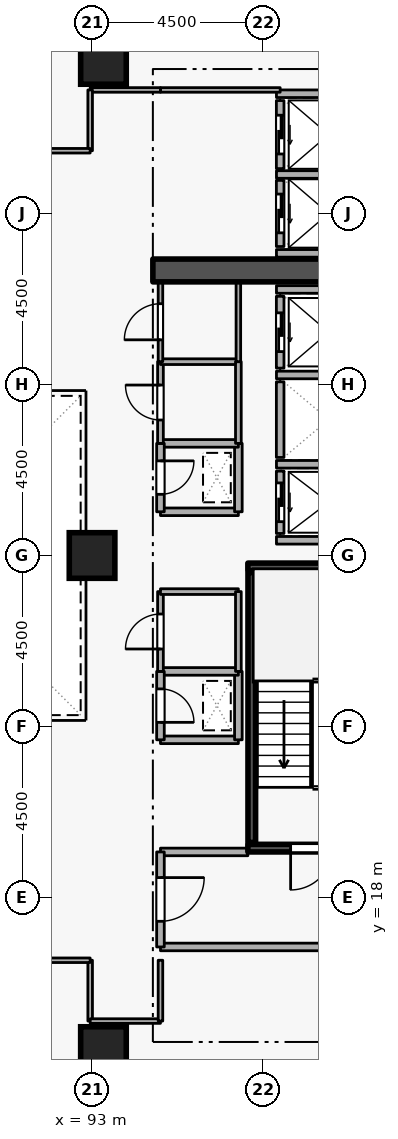
"""IFC4 building model, lengths in metres.
Left out: names, types, materials, properties, quantities, classifications, styles, units other than length and angle.
Written with IfcOpenShell. Run it as: python <this file> out.ifc"""

import sys

from ifc_helpers import new_model, si_unit, direction, frame, frame_2d, origin, origin_2d, place, context, subcontext, project, spatial, rectangle, extrude, element, fill, save


model = new_model("IFC4")
c1 = context("Model", 3, precision=1e-05, world=origin(), true_north=direction((0.0, 1.0)))
c2 = subcontext(c1, "Body", "Model", "MODEL_VIEW")
j1 = project(units=[si_unit("LENGTHUNIT", "METRE"), si_unit("PLANEANGLEUNIT", "RADIAN")], contexts=[c1])
p1 = place(None, origin())
s1 = spatial("IfcSite", under=j1, at=p1, CompositionType="ELEMENT")
p2 = place(p1, origin())
s2 = spatial("IfcBuilding", under=s1, at=p2, CompositionType="ELEMENT")
p3 = place(p2, frame((0.0, 0.0, 83.7)))
s3 = spatial("IfcBuildingStorey", under=s2, at=p3, CompositionType="ELEMENT", Elevation=83.7)
p4 = place(p3, frame((94.6, 34.5, 0.0), z_axis=(0.0, 0.0, 1.0), x_axis=(1.0, 0.0, 0.0)))
e1 = element("IfcWall", 1, at=p4, inside=s3, PredefinedType="SHEAR", context=c2, shape_type="SweptSolid", body=[
    extrude(rectangle(XDim=5.7, YDim=0.6, at=frame_2d((2.85, 0.0))), origin(), (0.0, 0.0, 1.0), 3.6),
])
for number, where, z_axis, x_axis in (
    (2, (93.3, 14.0, 0.0), (0.0, 0.0, 1.0), (1.0, 0.0, 0.0)),
    (3, (93.3, 40.0, 0.0), (0.0, 0.0, 1.0), (1.0, 0.0, 0.0)),
    (4, (93.0, 27.0, 0.0), (0.0, 0.0, 1.0), (1.0, 0.0, 0.0)),
):
    element("IfcColumn", number, at=place(p3, frame(where, z_axis=z_axis, x_axis=x_axis)), inside=s3, PredefinedType="COLUMN", context=c2, shape_type="SweptSolid", body=[
        extrude(rectangle(XDim=1.2, YDim=1.2, at=origin_2d()), origin(), (0.0, 0.0, 1.0), 3.6),
    ])
p5 = place(p3, frame((97.95, 29.22, 0.0), z_axis=(0.0, 0.0, 1.0), x_axis=(0.0, -1.0, 0.0)))
e5 = element("IfcWall", 5, at=p5, inside=s3, PredefinedType="STANDARD", context=c2, shape_type="SweptSolid", body=[
    extrude(rectangle(XDim=1.64, YDim=0.2, at=frame_2d((0.82, 0.0))), origin(), (0.0, 0.0, 1.0), 3.34),
])
p6 = place(p5, frame((0.31, 0.0, 0.0)))
e6 = element("IfcOpeningElement", 6, at=p6, cuts=e5, PredefinedType="OPENING", context=c2, shape_type="SweptSolid", body=[
    extrude(rectangle(XDim=1.02, YDim=2.06, at=frame_2d((0.51, 1.03))), frame((0.0, 0.11, 0.0), z_axis=(0.0, -1.0, 0.0), x_axis=(1.0, 0.0, 0.0)), (0.0, 0.0, 1.0), 0.22),
])
p7 = place(p3, frame((97.95, 31.57, 0.0), z_axis=(0.0, 0.0, 1.0), x_axis=(0.0, -1.0, 0.0)))
e7 = element("IfcWall", 7, at=p7, inside=s3, PredefinedType="STANDARD", context=c2, shape_type="SweptSolid", body=[
    extrude(rectangle(XDim=1.99, YDim=0.2, at=frame_2d((0.995, 0.0))), origin(), (0.0, 0.0, 1.0), 3.34),
])
p8 = place(p3, frame((97.95, 33.82, 0.0), z_axis=(0.0, 0.0, 1.0), x_axis=(0.0, -1.0, 0.0)))
e8 = element("IfcWall", 8, at=p8, inside=s3, PredefinedType="STANDARD", context=c2, shape_type="SweptSolid", body=[
    extrude(rectangle(XDim=1.89, YDim=0.2, at=frame_2d((0.945, 0.0))), origin(), (0.0, 0.0, 1.0), 3.34),
])
p9 = place(p8, frame((0.435, 0.0, 0.0)))
e9 = element("IfcOpeningElement", 9, at=p9, cuts=e8, PredefinedType="OPENING", context=c2, shape_type="SweptSolid", body=[
    extrude(rectangle(XDim=1.02, YDim=2.06, at=frame_2d((0.51, 1.03))), frame((0.0, 0.11, 0.0), z_axis=(0.0, -1.0, 0.0), x_axis=(1.0, 0.0, 0.0)), (0.0, 0.0, 1.0), 0.22),
])
p10 = place(p3, frame((97.95, 36.87, 0.0), z_axis=(0.0, 0.0, 1.0), x_axis=(0.0, -1.0, 0.0)))
e10 = element("IfcWall", 10, at=p10, inside=s3, PredefinedType="STANDARD", context=c2, shape_type="SweptSolid", body=[
    extrude(rectangle(XDim=1.74, YDim=0.2, at=frame_2d((0.87, 0.0))), origin(), (0.0, 0.0, 1.0), 3.34),
])
p11 = place(p10, frame((0.36, 0.0, 0.0)))
e11 = element("IfcOpeningElement", 11, at=p11, cuts=e10, PredefinedType="OPENING", context=c2, shape_type="SweptSolid", body=[
    extrude(rectangle(XDim=1.02, YDim=2.06, at=frame_2d((0.51, 1.03))), frame((0.0, 0.11, 0.0), z_axis=(0.0, -1.0, 0.0), x_axis=(1.0, 0.0, 0.0)), (0.0, 0.0, 1.0), 0.22),
])
p12 = place(p3, frame((97.95, 38.97, 0.0), z_axis=(0.0, 0.0, 1.0), x_axis=(0.0, -1.0, 0.0)))
e12 = element("IfcWall", 12, at=p12, inside=s3, PredefinedType="STANDARD", context=c2, shape_type="SweptSolid", body=[
    extrude(rectangle(XDim=1.79, YDim=0.2, at=frame_2d((0.895, 0.0))), origin(), (0.0, 0.0, 1.0), 3.34),
])
p13 = place(p12, frame((0.385, 0.0, 0.0)))
e13 = element("IfcOpeningElement", 13, at=p13, cuts=e12, PredefinedType="OPENING", context=c2, shape_type="SweptSolid", body=[
    extrude(rectangle(XDim=1.02, YDim=2.06, at=frame_2d((0.51, 1.03))), frame((0.0, 0.11, 0.0), z_axis=(0.0, -1.0, 0.0), x_axis=(1.0, 0.0, 0.0)), (0.0, 0.0, 1.0), 0.22),
])
for number, where, z_axis, x_axis in (
    (14, (97.852, 29.4, 0.0), (0.0, 0.0, 1.0), (1.0, 0.0, 0.0)),
    (15, (97.852, 27.4, 0.0), (0.0, 0.0, 1.0), (1.0, 0.0, 0.0)),
    (16, (97.852, 31.75, 0.0), (0.0, 0.0, 1.0), (1.0, 0.0, 0.0)),
    (17, (97.852, 34.0, 0.0), (0.0, 0.0, 1.0), (1.0, 0.0, 0.0)),
):
    element("IfcWall", number, at=place(p3, frame(where, z_axis=z_axis, x_axis=x_axis)), inside=s3, PredefinedType="STANDARD", context=c2, shape_type="SweptSolid", body=[
        extrude(rectangle(XDim=2.436, YDim=0.2, at=frame_2d((1.218, 0.0))), origin(), (0.0, 0.0, 1.0), 3.34),
    ])
for number, where, z_axis, x_axis in (
    (18, (97.852, 37.025, 0.0), (0.0, 0.0, 1.0), (1.0, 0.0, 0.0)),
    (19, (97.852, 34.95, 0.0), (0.0, 0.0, 1.0), (1.0, 0.0, 0.0)),
):
    element("IfcWall", number, at=place(p3, frame(where, z_axis=z_axis, x_axis=x_axis)), inside=s3, PredefinedType="STANDARD", context=c2, shape_type="SweptSolid", body=[
        extrude(rectangle(XDim=2.746, YDim=0.2, at=frame_2d((1.373, 0.0))), origin(), (0.0, 0.0, 1.0), 3.34),
    ])
p14 = place(p3, frame((97.852, 39.15, 0.0), z_axis=(0.0, 0.0, 1.0), x_axis=(1.0, 0.0, 0.0)))
e20 = element("IfcWall", 20, at=p14, inside=s3, PredefinedType="STANDARD", context=c2, shape_type="SweptSolid", body=[
    extrude(rectangle(XDim=2.636, YDim=0.2, at=frame_2d((1.318, 0.0))), origin(), (0.0, 0.0, 1.0), 3.34),
])
p15 = place(p3, frame((100.45, 19.3, 0.0), z_axis=(0.0, 0.0, 1.0), x_axis=(-1.0, 0.0, 0.0)))
e21 = element("IfcWall", 21, at=p15, inside=s3, PredefinedType="SHEAR", context=c2, shape_type="SweptSolid", body=[
    extrude(rectangle(XDim=3.35, YDim=0.2, at=frame_2d((1.675, 0.0))), origin(), (0.0, 0.0, 1.0), 3.6),
])
p16 = place(p15, frame((1.125, 0.0, 0.0)))
e22 = element("IfcOpeningElement", 22, at=p16, cuts=e21, PredefinedType="OPENING", context=c2, shape_type="SweptSolid", body=[
    extrude(rectangle(XDim=1.1, YDim=2.1, at=frame_2d((0.55, 1.05))), frame((0.0, 0.11, 0.0), z_axis=(0.0, -1.0, 0.0), x_axis=(1.0, 0.0, 0.0)), (0.0, 0.0, 1.0), 0.22),
])
p17 = place(p3, frame((97.1, 26.7, 0.0), z_axis=(0.0, 0.0, 1.0), x_axis=(1.0, 0.0, 0.0)))
e23 = element("IfcWall", 23, at=p17, inside=s3, PredefinedType="SHEAR", context=c2, shape_type="SweptSolid", body=[
    extrude(rectangle(XDim=3.35, YDim=0.2, at=frame_2d((1.675, 0.0))), origin(), (0.0, 0.0, 1.0), 3.6),
])
p18 = place(p3, frame((97.203, 26.55, 0.0), z_axis=(0.0, 0.0, 1.0), x_axis=(0.0, -1.0, 0.0)))
e24 = element("IfcWall", 24, at=p18, inside=s3, PredefinedType="SHEAR", context=c2, shape_type="SweptSolid", body=[
    extrude(rectangle(XDim=7.1, YDim=0.2, at=frame_2d((3.55, 0.0))), origin(), (0.0, 0.0, 1.0), 3.6),
])
p19 = place(p3, frame((94.8, 16.7, 0.0), z_axis=(0.0, 0.0, 1.0), x_axis=(1.0, 0.0, 0.0)))
e25 = element("IfcWall", 25, at=p19, inside=s3, PredefinedType="STANDARD", context=c2, shape_type="SweptSolid", body=[
    extrude(rectangle(XDim=5.7, YDim=0.2, at=frame_2d((2.85, 0.0))), origin(), (0.0, 0.0, 1.0), 3.34),
])
p20 = place(p3, frame((97.1, 19.2, 0.0), z_axis=(0.0, 0.0, 1.0), x_axis=(-1.0, 0.0, 0.0)))
e26 = element("IfcWall", 26, at=p20, inside=s3, PredefinedType="STANDARD", context=c2, shape_type="SweptSolid", body=[
    extrude(rectangle(XDim=2.3, YDim=0.2, at=frame_2d((1.15, 0.0))), origin(), (0.0, 0.0, 1.0), 2.545),
])
p21 = place(p3, frame((94.8, 19.2, 0.0), z_axis=(0.0, 0.0, 1.0), x_axis=(0.0, -1.0, 0.0)))
e27 = element("IfcWall", 27, at=p21, inside=s3, PredefinedType="STANDARD", context=c2, shape_type="SweptSolid", body=[
    extrude(rectangle(XDim=2.5, YDim=0.2, at=frame_2d((1.25, 0.0))), origin(), (0.0, 0.0, 1.0), 3.34),
])
p22 = place(p21, frame((0.675, 0.0, 0.0)))
e28 = element("IfcOpeningElement", 28, at=p22, cuts=e27, PredefinedType="OPENING", context=c2, shape_type="SweptSolid", body=[
    extrude(rectangle(XDim=1.15, YDim=2.1, at=frame_2d((0.575, 1.05))), frame((0.0, 0.11, 0.0), z_axis=(0.0, -1.0, 0.0), x_axis=(1.0, 0.0, 0.0)), (0.0, 0.0, 1.0), 0.22),
])
p23 = place(p3, frame((94.8, 28.15, 0.0), z_axis=(0.0, 0.0, 1.0), x_axis=(1.0, 0.0, 0.0)))
e29 = element("IfcWall", 29, at=p23, inside=s3, PredefinedType="STANDARD", context=c2, shape_type="SweptSolid", body=[
    extrude(rectangle(XDim=2.05, YDim=0.2, at=frame_2d((1.025, 0.0))), origin(), (0.0, 0.0, 1.0), 3.34),
])
p24 = place(p3, frame((96.85, 28.15, 0.0), z_axis=(0.0, 0.0, 1.0), x_axis=(0.0, 1.0, 0.0)))
e30 = element("IfcWall", 30, at=p24, inside=s3, PredefinedType="STANDARD", context=c2, shape_type="SweptSolid", body=[
    extrude(rectangle(XDim=1.8, YDim=0.2, at=frame_2d((0.9, 0.0))), origin(), (0.0, 0.0, 1.0), 3.34),
])
p25 = place(p3, frame((96.85, 29.95, 0.0), z_axis=(0.0, 0.0, 1.0), x_axis=(-1.0, 0.0, 0.0)))
e31 = element("IfcWall", 31, at=p25, inside=s3, PredefinedType="STANDARD", context=c2, shape_type="SweptSolid", body=[
    extrude(rectangle(XDim=2.05, YDim=0.2, at=frame_2d((1.025, 0.0))), origin(), (0.0, 0.0, 1.0), 3.34),
])
p26 = place(p3, frame((94.8, 29.95, 0.0), z_axis=(0.0, 0.0, 1.0), x_axis=(0.0, -1.0, 0.0)))
e32 = element("IfcWall", 32, at=p26, inside=s3, PredefinedType="STANDARD", context=c2, shape_type="SweptSolid", body=[
    extrude(rectangle(XDim=1.8, YDim=0.2, at=frame_2d((0.9, 0.0))), origin(), (0.0, 0.0, 1.0), 3.34),
])
p27 = place(p26, frame((0.46, 0.0, 0.0)))
e33 = element("IfcOpeningElement", 33, at=p27, cuts=e32, PredefinedType="OPENING", context=c2, shape_type="SweptSolid", body=[
    extrude(rectangle(XDim=0.88, YDim=2.04, at=frame_2d((0.44, 1.02))), frame((0.0, 0.11, 0.0), z_axis=(0.0, -1.0, 0.0), x_axis=(1.0, 0.0, 0.0)), (0.0, 0.0, 1.0), 0.22),
])
p28 = place(p3, frame((94.8, 22.15, 0.0), z_axis=(0.0, 0.0, 1.0), x_axis=(1.0, 0.0, 0.0)))
e34 = element("IfcWall", 34, at=p28, inside=s3, PredefinedType="STANDARD", context=c2, shape_type="SweptSolid", body=[
    extrude(rectangle(XDim=2.05, YDim=0.2, at=frame_2d((1.025, 0.0))), origin(), (0.0, 0.0, 1.0), 3.34),
])
p29 = place(p3, frame((96.85, 22.15, 0.0), z_axis=(0.0, 0.0, 1.0), x_axis=(0.0, 1.0, 0.0)))
e35 = element("IfcWall", 35, at=p29, inside=s3, PredefinedType="STANDARD", context=c2, shape_type="SweptSolid", body=[
    extrude(rectangle(XDim=1.8, YDim=0.2, at=frame_2d((0.9, 0.0))), origin(), (0.0, 0.0, 1.0), 3.34),
])
p30 = place(p3, frame((96.85, 23.95, 0.0), z_axis=(0.0, 0.0, 1.0), x_axis=(-1.0, 0.0, 0.0)))
e36 = element("IfcWall", 36, at=p30, inside=s3, PredefinedType="STANDARD", context=c2, shape_type="SweptSolid", body=[
    extrude(rectangle(XDim=2.05, YDim=0.2, at=frame_2d((1.025, 0.0))), origin(), (0.0, 0.0, 1.0), 3.34),
])
p31 = place(p3, frame((94.8, 23.95, 0.0), z_axis=(0.0, 0.0, 1.0), x_axis=(0.0, -1.0, 0.0)))
e37 = element("IfcWall", 37, at=p31, inside=s3, PredefinedType="STANDARD", context=c2, shape_type="SweptSolid", body=[
    extrude(rectangle(XDim=1.8, YDim=0.2, at=frame_2d((0.9, 0.0))), origin(), (0.0, 0.0, 1.0), 3.34),
])
p32 = place(p31, frame((0.46, 0.0, 0.0)))
e38 = element("IfcOpeningElement", 38, at=p32, cuts=e37, PredefinedType="OPENING", context=c2, shape_type="SweptSolid", body=[
    extrude(rectangle(XDim=0.88, YDim=2.04, at=frame_2d((0.44, 1.02))), frame((0.0, 0.11, 0.0), z_axis=(0.0, -1.0, 0.0), x_axis=(1.0, 0.0, 0.0)), (0.0, 0.0, 1.0), 0.22),
])
p33 = place(p3, frame((94.8, 23.95, 0.0), z_axis=(0.0, 0.0, 1.0), x_axis=(0.0, 1.0, 0.0)))
e39 = element("IfcWall", 39, at=p33, inside=s3, PredefinedType="PARTITIONING", context=c2, shape_type="SweptSolid", body=[
    extrude(rectangle(XDim=2.1, YDim=0.15, at=frame_2d((1.05, 0.0))), origin(), (0.0, 0.0, 1.0), 3.34),
])
p34 = place(p33, frame((0.59, 0.0, 0.0)))
e40 = element("IfcOpeningElement", 40, at=p34, cuts=e39, PredefinedType="OPENING", context=c2, shape_type="SweptSolid", body=[
    extrude(rectangle(XDim=0.92, YDim=2.08, at=frame_2d((0.46, 1.04))), frame((0.0, 0.085, 0.0), z_axis=(0.0, -1.0, 0.0), x_axis=(1.0, 0.0, 0.0)), (0.0, 0.0, 1.0), 0.17),
])
p35 = place(p3, frame((94.8, 26.05, 0.0), z_axis=(0.0, 0.0, 1.0), x_axis=(1.0, 0.0, 0.0)))
e41 = element("IfcWall", 41, at=p35, inside=s3, PredefinedType="PARTITIONING", context=c2, shape_type="SweptSolid", body=[
    extrude(rectangle(XDim=2.05, YDim=0.15, at=frame_2d((1.025, 0.0))), origin(), (0.0, 0.0, 1.0), 3.34),
])
p36 = place(p3, frame((96.85, 26.05, 0.0), z_axis=(0.0, 0.0, 1.0), x_axis=(0.0, -1.0, 0.0)))
e42 = element("IfcWall", 42, at=p36, inside=s3, PredefinedType="PARTITIONING", context=c2, shape_type="SweptSolid", body=[
    extrude(rectangle(XDim=2.1, YDim=0.15, at=frame_2d((1.05, 0.0))), origin(), (0.0, 0.0, 1.0), 3.34),
])
p37 = place(p3, frame((94.8, 29.95, 0.0), z_axis=(0.0, 0.0, 1.0), x_axis=(0.0, 1.0, 0.0)))
e43 = element("IfcWall", 43, at=p37, inside=s3, PredefinedType="PARTITIONING", context=c2, shape_type="SweptSolid", body=[
    extrude(rectangle(XDim=2.15, YDim=0.15, at=frame_2d((1.075, 0.0))), origin(), (0.0, 0.0, 1.0), 3.34),
])
p38 = place(p37, frame((0.615, 0.0, 0.0)))
e44 = element("IfcOpeningElement", 44, at=p38, cuts=e43, PredefinedType="OPENING", context=c2, shape_type="SweptSolid", body=[
    extrude(rectangle(XDim=0.92, YDim=2.08, at=frame_2d((0.46, 1.04))), frame((0.0, 0.085, 0.0), z_axis=(0.0, -1.0, 0.0), x_axis=(1.0, 0.0, 0.0)), (0.0, 0.0, 1.0), 0.17),
])
p39 = place(p3, frame((94.8, 32.1, 0.0), z_axis=(0.0, 0.0, 1.0), x_axis=(1.0, 0.0, 0.0)))
e45 = element("IfcWall", 45, at=p39, inside=s3, PredefinedType="PARTITIONING", context=c2, shape_type="SweptSolid", body=[
    extrude(rectangle(XDim=2.05, YDim=0.15, at=frame_2d((1.025, 0.0))), origin(), (0.0, 0.0, 1.0), 3.34),
])
p40 = place(p3, frame((96.85, 32.1, 0.0), z_axis=(0.0, 0.0, 1.0), x_axis=(0.0, -1.0, 0.0)))
e46 = element("IfcWall", 46, at=p40, inside=s3, PredefinedType="PARTITIONING", context=c2, shape_type="SweptSolid", body=[
    extrude(rectangle(XDim=2.15, YDim=0.15, at=frame_2d((1.075, 0.0))), origin(), (0.0, 0.0, 1.0), 3.34),
])
p41 = place(p3, frame((94.8, 32.1, 0.0), z_axis=(0.0, 0.0, 1.0), x_axis=(0.0, 1.0, 0.0)))
e47 = element("IfcWall", 47, at=p41, inside=s3, PredefinedType="PARTITIONING", context=c2, shape_type="SweptSolid", body=[
    extrude(rectangle(XDim=2.1, YDim=0.12, at=frame_2d((1.05, 0.0))), origin(), (0.0, 0.0, 1.0), 3.34),
])
p42 = place(p41, frame((0.575, 0.0, 0.0)))
e48 = element("IfcOpeningElement", 48, at=p42, cuts=e47, PredefinedType="OPENING", context=c2, shape_type="SweptSolid", body=[
    extrude(rectangle(XDim=0.95, YDim=2.1, at=frame_2d((0.475, 1.05))), frame((0.0, 0.07, 0.0), z_axis=(0.0, -1.0, 0.0), x_axis=(1.0, 0.0, 0.0)), (0.0, 0.0, 1.0), 0.14),
])
p43 = place(p3, frame((96.85, 34.2, 0.0), z_axis=(0.0, 0.0, 1.0), x_axis=(0.0, -1.0, 0.0)))
e49 = element("IfcWall", 49, at=p43, inside=s3, PredefinedType="PARTITIONING", context=c2, shape_type="SweptSolid", body=[
    extrude(rectangle(XDim=2.1, YDim=0.12, at=frame_2d((1.05, 0.0))), origin(), (0.0, 0.0, 1.0), 3.34),
])
p44 = place(p3, frame((92.95, 16.35, 0.0), z_axis=(0.0, 0.0, 1.0), x_axis=(0.0, -1.0, 0.0)))
e50 = element("IfcWall", 50, at=p44, inside=s3, PredefinedType="PARTITIONING", context=c2, shape_type="SweptSolid", body=[
    extrude(rectangle(XDim=1.6, YDim=0.12, at=frame_2d((0.8, 0.0))), origin(), (0.0, 0.0, 1.0), 3.34),
])
p45 = place(p3, frame((92.95, 14.75, 0.0), z_axis=(0.0, 0.0, 1.0), x_axis=(1.0, 0.0, 0.0)))
e51 = element("IfcWall", 51, at=p45, inside=s3, PredefinedType="PARTITIONING", context=c2, shape_type="SweptSolid", body=[
    extrude(rectangle(XDim=1.85, YDim=0.12, at=frame_2d((0.925, 0.0))), origin(), (0.0, 0.0, 1.0), 3.34),
])
p46 = place(p3, frame((94.8, 14.75, 0.0), z_axis=(0.0, 0.0, 1.0), x_axis=(0.0, 1.0, 0.0)))
e52 = element("IfcWall", 52, at=p46, inside=s3, PredefinedType="PARTITIONING", context=c2, shape_type="SweptSolid", body=[
    extrude(rectangle(XDim=1.6, YDim=0.12, at=frame_2d((0.8, 0.0))), origin(), (0.0, 0.0, 1.0), 3.34),
])
p47 = place(p3, frame((88.5, 16.35, 0.0), z_axis=(0.0, 0.0, 1.0), x_axis=(1.0, 0.0, 0.0)))
e53 = element("IfcWall", 53, at=p47, inside=s3, PredefinedType="PARTITIONING", context=c2, shape_type="SweptSolid", body=[
    extrude(rectangle(XDim=4.45, YDim=0.12, at=frame_2d((2.225, 0.0))), origin(), (0.0, 0.0, 1.0), 3.34),
])
p48 = place(p47, frame((1.7, 0.0, 0.0)))
e54 = element("IfcOpeningElement", 54, at=p48, cuts=e53, PredefinedType="OPENING", context=c2, shape_type="SweptSolid", body=[
    extrude(rectangle(XDim=1.05, YDim=2.1, at=frame_2d((0.525, 1.05))), frame((0.0, 0.07, 0.0), z_axis=(0.0, -1.0, 0.0), x_axis=(1.0, 0.0, 0.0)), (0.0, 0.0, 1.0), 0.14),
])
p49 = place(p3, frame((97.95, 39.25, 0.0), z_axis=(0.0, 0.0, 1.0), x_axis=(-1.0, 0.0, 0.0)))
e55 = element("IfcWall", 55, at=p49, inside=s3, PredefinedType="PARTITIONING", context=c2, shape_type="SweptSolid", body=[
    extrude(rectangle(XDim=3.15, YDim=0.12, at=frame_2d((1.575, 0.0))), origin(), (0.0, 0.0, 1.0), 3.34),
])
p50 = place(p3, frame((94.8, 39.25, 0.0), z_axis=(0.0, 0.0, 1.0), x_axis=(-1.0, 0.0, 0.0)))
e56 = element("IfcWall", 56, at=p50, inside=s3, PredefinedType="PARTITIONING", context=c2, shape_type="SweptSolid", body=[
    extrude(rectangle(XDim=1.85, YDim=0.12, at=frame_2d((0.925, 0.0))), origin(), (0.0, 0.0, 1.0), 3.34),
])
p51 = place(p3, frame((92.95, 39.25, 0.0), z_axis=(0.0, 0.0, 1.0), x_axis=(0.0, -1.0, 0.0)))
e57 = element("IfcWall", 57, at=p51, inside=s3, PredefinedType="PARTITIONING", context=c2, shape_type="SweptSolid", body=[
    extrude(rectangle(XDim=1.6, YDim=0.12, at=frame_2d((0.8, 0.0))), origin(), (0.0, 0.0, 1.0), 3.34),
])
p52 = place(p3, frame((92.95, 37.65, 0.0), z_axis=(0.0, 0.0, 1.0), x_axis=(-1.0, 0.0, 0.0)))
e58 = element("IfcWall", 58, at=p52, inside=s3, PredefinedType="PARTITIONING", context=c2, shape_type="SweptSolid", body=[
    extrude(rectangle(XDim=4.45, YDim=0.12, at=frame_2d((2.225, 0.0))), origin(), (0.0, 0.0, 1.0), 3.34),
])
p53 = place(p52, frame((1.7, 0.0, 0.0)))
e59 = element("IfcOpeningElement", 59, at=p53, cuts=e58, PredefinedType="OPENING", context=c2, shape_type="SweptSolid", body=[
    extrude(rectangle(XDim=1.05, YDim=2.1, at=frame_2d((0.525, 1.05))), frame((0.0, 0.07, 0.0), z_axis=(0.0, -1.0, 0.0), x_axis=(1.0, 0.0, 0.0)), (0.0, 0.0, 1.0), 0.14),
])
p54 = place(p6, origin())
e60 = element("IfcDoor", 60, at=p54, inside=s3, OperationType="SLIDING_TO_LEFT", PredefinedType="DOOR", context=c2, shape_type="SweptSolid", body=[
    extrude(rectangle(XDim=1.02, YDim=2.06, at=frame_2d((0.51, 1.03))), frame((0.0, 0.025, 0.0), z_axis=(0.0, -1.0, 0.0), x_axis=(1.0, 0.0, 0.0)), (0.0, 0.0, 1.0), 0.05),
])
fill(e6, e60)
p55 = place(p9, origin())
e61 = element("IfcDoor", 61, at=p55, inside=s3, OperationType="SLIDING_TO_LEFT", PredefinedType="DOOR", context=c2, shape_type="SweptSolid", body=[
    extrude(rectangle(XDim=1.02, YDim=2.06, at=frame_2d((0.51, 1.03))), frame((0.0, 0.025, 0.0), z_axis=(0.0, -1.0, 0.0), x_axis=(1.0, 0.0, 0.0)), (0.0, 0.0, 1.0), 0.05),
])
fill(e9, e61)
p56 = place(p11, origin())
e62 = element("IfcDoor", 62, at=p56, inside=s3, OperationType="SLIDING_TO_LEFT", PredefinedType="DOOR", context=c2, shape_type="SweptSolid", body=[
    extrude(rectangle(XDim=1.02, YDim=2.06, at=frame_2d((0.51, 1.03))), frame((0.0, 0.025, 0.0), z_axis=(0.0, -1.0, 0.0), x_axis=(1.0, 0.0, 0.0)), (0.0, 0.0, 1.0), 0.05),
])
fill(e11, e62)
p57 = place(p13, origin())
e63 = element("IfcDoor", 63, at=p57, inside=s3, OperationType="SLIDING_TO_LEFT", PredefinedType="DOOR", context=c2, shape_type="SweptSolid", body=[
    extrude(rectangle(XDim=1.02, YDim=2.06, at=frame_2d((0.51, 1.03))), frame((0.0, 0.025, 0.0), z_axis=(0.0, -1.0, 0.0), x_axis=(1.0, 0.0, 0.0)), (0.0, 0.0, 1.0), 0.05),
])
fill(e13, e63)
p58 = place(p16, origin())
e64 = element("IfcDoor", 64, at=p58, inside=s3, OperationType="SINGLE_SWING_RIGHT", PredefinedType="DOOR", context=c2, shape_type="SweptSolid", body=[
    extrude(rectangle(XDim=1.1, YDim=2.1, at=frame_2d((0.55, 1.05))), frame((0.0, 0.025, 0.0), z_axis=(0.0, -1.0, 0.0), x_axis=(1.0, 0.0, 0.0)), (0.0, 0.0, 1.0), 0.05),
])
fill(e22, e64)
p59 = place(p22, origin())
e65 = element("IfcDoor", 65, at=p59, inside=s3, OperationType="SINGLE_SWING_LEFT", PredefinedType="DOOR", context=c2, shape_type="SweptSolid", body=[
    extrude(rectangle(XDim=1.15, YDim=2.1, at=frame_2d((0.575, 1.05))), frame((0.0, 0.025, 0.0), z_axis=(0.0, -1.0, 0.0), x_axis=(1.0, 0.0, 0.0)), (0.0, 0.0, 1.0), 0.05),
])
fill(e28, e65)
p60 = place(p27, origin())
e66 = element("IfcDoor", 66, at=p60, inside=s3, OperationType="SINGLE_SWING_LEFT", PredefinedType="DOOR", context=c2, shape_type="SweptSolid", body=[
    extrude(rectangle(XDim=0.88, YDim=2.04, at=frame_2d((0.44, 1.02))), frame((0.0, 0.025, 0.0), z_axis=(0.0, -1.0, 0.0), x_axis=(1.0, 0.0, 0.0)), (0.0, 0.0, 1.0), 0.05),
])
fill(e33, e66)
p61 = place(p32, origin())
e67 = element("IfcDoor", 67, at=p61, inside=s3, OperationType="SINGLE_SWING_RIGHT", PredefinedType="DOOR", context=c2, shape_type="SweptSolid", body=[
    extrude(rectangle(XDim=0.88, YDim=2.04, at=frame_2d((0.44, 1.02))), frame((0.0, 0.025, 0.0), z_axis=(0.0, -1.0, 0.0), x_axis=(1.0, 0.0, 0.0)), (0.0, 0.0, 1.0), 0.05),
])
fill(e38, e67)
p62 = place(p34, origin())
e68 = element("IfcDoor", 68, at=p62, inside=s3, OperationType="SINGLE_SWING_LEFT", PredefinedType="DOOR", context=c2, shape_type="SweptSolid", body=[
    extrude(rectangle(XDim=0.92, YDim=2.08, at=frame_2d((0.46, 1.04))), frame((0.0, 0.025, 0.0), z_axis=(0.0, -1.0, 0.0), x_axis=(1.0, 0.0, 0.0)), (0.0, 0.0, 1.0), 0.05),
])
fill(e40, e68)
p63 = place(p38, origin())
e69 = element("IfcDoor", 69, at=p63, inside=s3, OperationType="SINGLE_SWING_RIGHT", PredefinedType="DOOR", context=c2, shape_type="SweptSolid", body=[
    extrude(rectangle(XDim=0.92, YDim=2.08, at=frame_2d((0.46, 1.04))), frame((0.0, 0.025, 0.0), z_axis=(0.0, -1.0, 0.0), x_axis=(1.0, 0.0, 0.0)), (0.0, 0.0, 1.0), 0.05),
])
fill(e44, e69)
p64 = place(p42, origin())
e70 = element("IfcDoor", 70, at=p64, inside=s3, OperationType="SINGLE_SWING_LEFT", PredefinedType="DOOR", context=c2, shape_type="SweptSolid", body=[
    extrude(rectangle(XDim=0.95, YDim=2.1, at=frame_2d((0.475, 1.05))), frame((0.0, 0.025, 0.0), z_axis=(0.0, -1.0, 0.0), x_axis=(1.0, 0.0, 0.0)), (0.0, 0.0, 1.0), 0.05),
])
fill(e48, e70)
save(model, sys.argv[1])
